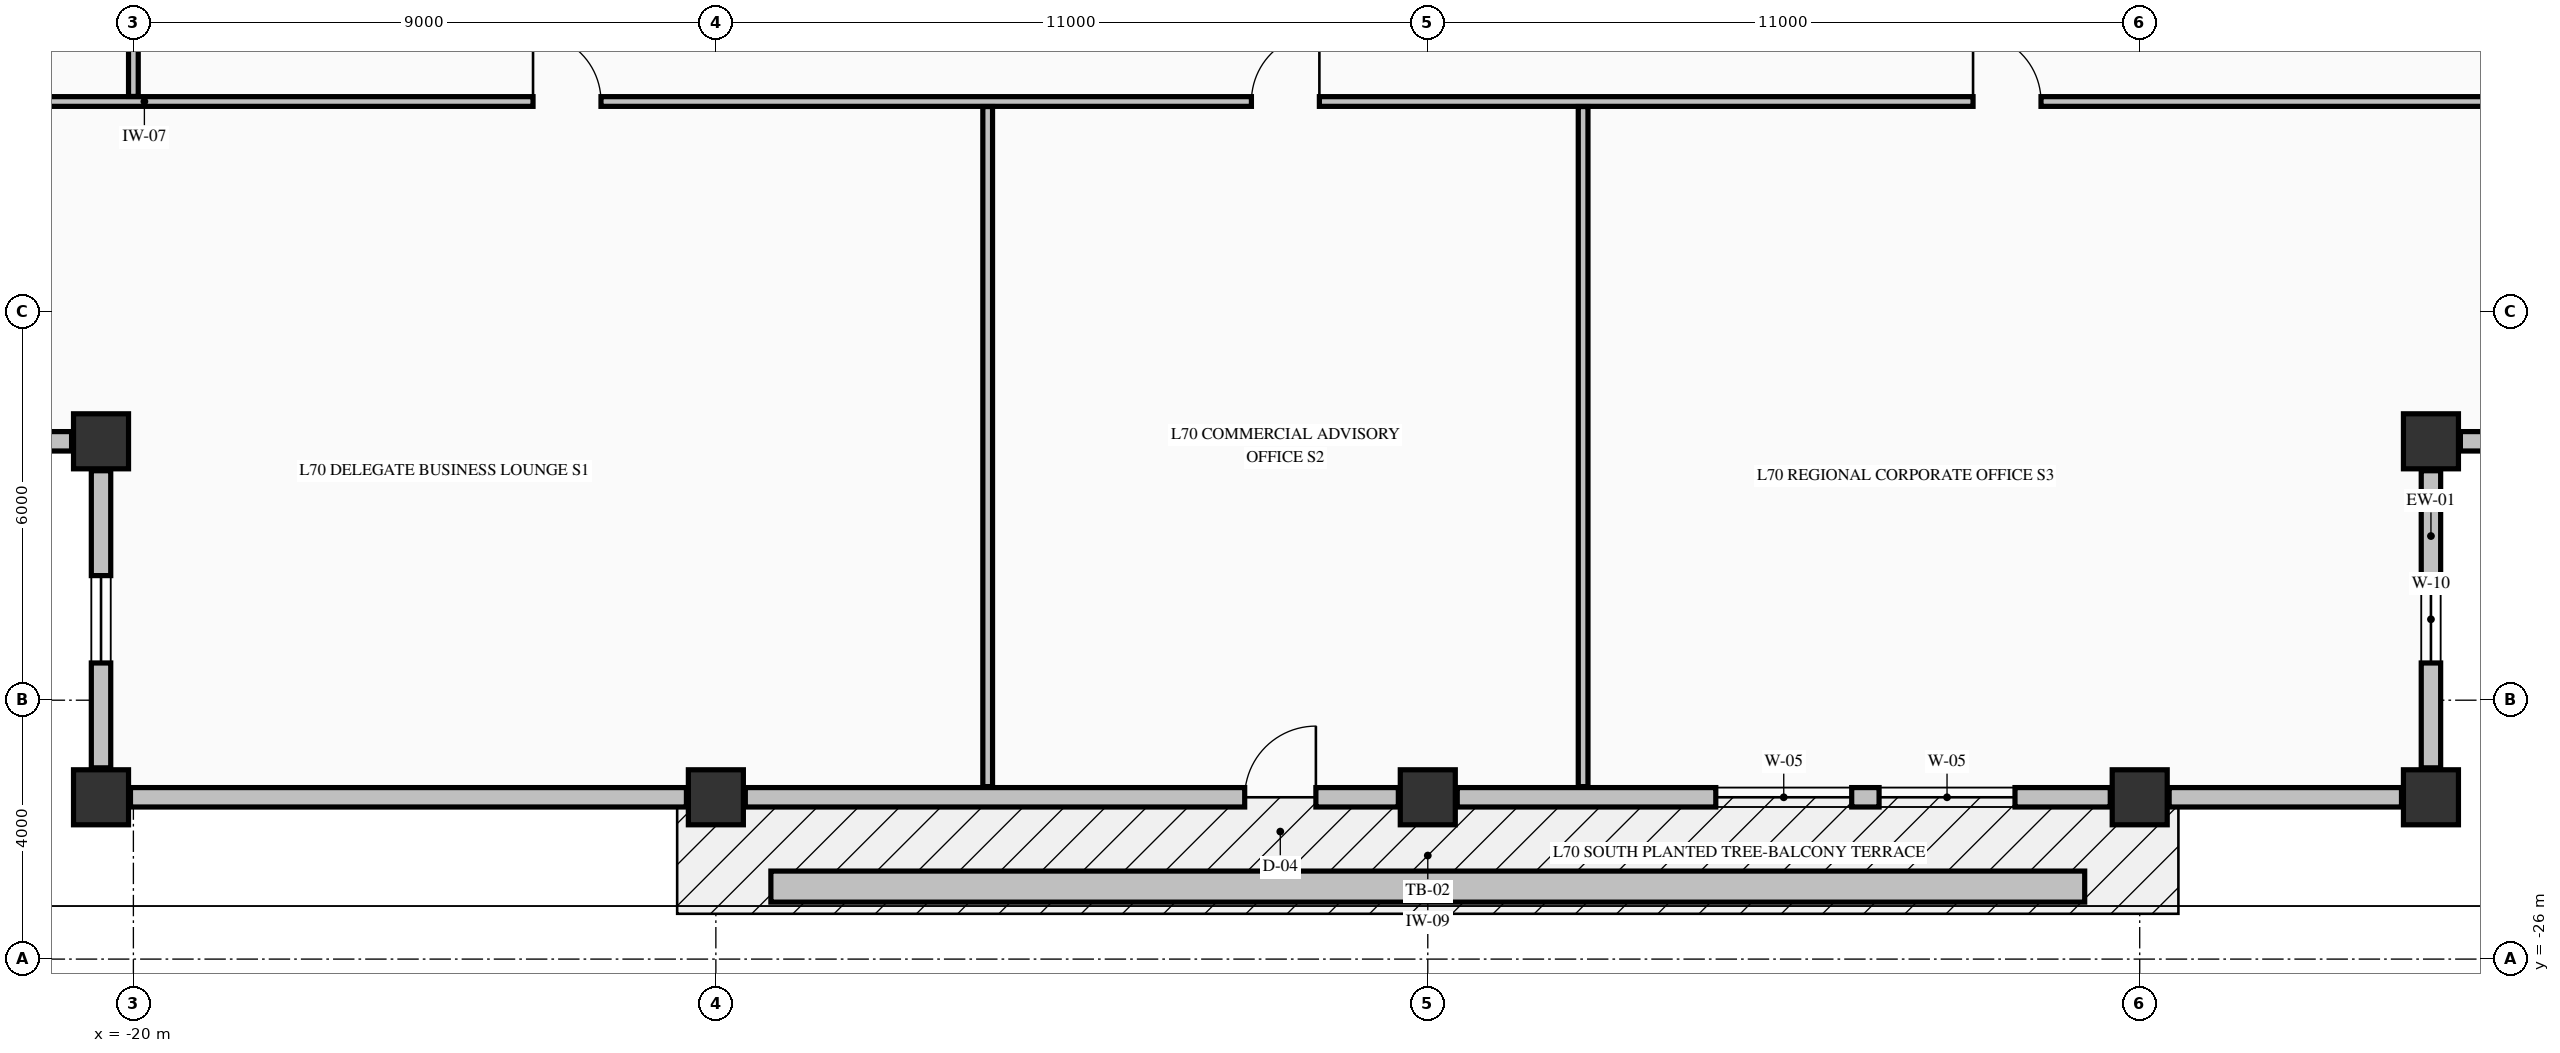
"""IFC4 building model, lengths in metres.
Left out: names, types, materials, properties, quantities, classifications, styles, units other than length and angle.
Written with IfcOpenShell. Run it as: python <this file> out.ifc"""

import sys

from ifc_helpers import new_model, si_unit, direction, frame, frame_2d, origin, origin_2d, place, context, subcontext, project, spatial, rectangle, extrude, element, fill, save


model = new_model("IFC4")
c1 = context("Model", 3, precision=1e-05, world=origin(), true_north=direction((0.0, 1.0)))
c2 = subcontext(c1, "Body", "Model", "MODEL_VIEW")
j1 = project(units=[si_unit("LENGTHUNIT", "METRE"), si_unit("PLANEANGLEUNIT", "RADIAN")], contexts=[c1])
p1 = place(None, origin())
s1 = spatial("IfcSite", under=j1, at=p1, CompositionType="ELEMENT")
p2 = place(p1, origin())
s2 = spatial("IfcBuilding", under=s1, at=p2, CompositionType="ELEMENT")
p3 = place(p2, frame((0.0, 0.0, 264.12)))
s3 = spatial("IfcBuildingStorey", under=s2, at=p3, CompositionType="ELEMENT", Elevation=264.12)
for number, where, z_axis, x_axis in (
    (1, (-20.5, -23.5, -0.25), (0.0, 0.0, 1.0), (1.0, 0.0, 0.0)),
    (2, (-11.0, -23.5, -0.25), (0.0, 0.0, 1.0), (1.0, 0.0, 0.0)),
    (3, (0.0, -23.5, -0.25), (0.0, 0.0, 1.0), (1.0, 0.0, 0.0)),
    (4, (11.0, -23.5, -0.25), (0.0, 0.0, 1.0), (1.0, 0.0, 0.0)),
    (5, (15.5, -23.5, -0.25), (0.0, 0.0, 1.0), (1.0, 0.0, 0.0)),
    (6, (-20.5, -18.0, -0.25), (0.0, 0.0, 1.0), (1.0, 0.0, 0.0)),
    (7, (15.5, -18.0, -0.25), (0.0, 0.0, 1.0), (1.0, 0.0, 0.0)),
):
    element("IfcColumn", number, at=place(p3, frame(where, z_axis=z_axis, x_axis=x_axis)), inside=s3, PredefinedType="COLUMN", context=c2, shape_type="SweptSolid", body=[
        extrude(rectangle(XDim=0.85, YDim=0.85, at=origin_2d()), origin(), (0.0, 0.0, 1.0), 3.23),
    ])
p4 = place(p3, frame((15.5, -23.045, 0.0), z_axis=(0.0, 0.0, 1.0), x_axis=(0.0, 1.0, 0.0)))
e8 = element("IfcWall", 8, at=p4, inside=s3, PredefinedType="STANDARD", context=c2, shape_type="SweptSolid", body=[
    extrude(rectangle(XDim=4.59, YDim=0.3, at=frame_2d((2.295, 0.0))), origin(), (0.0, 0.0, 1.0), 2.372),
])
p5 = place(p4, frame((1.62, 0.0, 0.68)))
e9 = element("IfcOpeningElement", 9, at=p5, cuts=e8, PredefinedType="OPENING", context=c2, shape_type="SweptSolid", body=[
    extrude(rectangle(XDim=1.35, YDim=1.42, at=frame_2d((0.675, 0.71))), frame((0.0, 0.16, 0.0), z_axis=(0.0, -1.0, 0.0), x_axis=(1.0, 0.0, 0.0)), (0.0, 0.0, 1.0), 0.32),
])
p6 = place(p3, frame((15.955, -18.0, 0.0), z_axis=(0.0, 0.0, 1.0), x_axis=(1.0, 0.0, 0.0)))
e10 = element("IfcWall", 10, at=p6, inside=s3, PredefinedType="STANDARD", context=c2, shape_type="SweptSolid", body=[
    extrude(rectangle(XDim=4.59, YDim=0.3, at=frame_2d((2.295, 0.0))), origin(), (0.0, 0.0, 1.0), 2.372),
])
p7 = place(p6, frame((1.62, 0.0, 0.68)))
e11 = element("IfcOpeningElement", 11, at=p7, cuts=e10, PredefinedType="OPENING", context=c2, shape_type="SweptSolid", body=[
    extrude(rectangle(XDim=1.35, YDim=1.42, at=frame_2d((0.675, 0.71))), frame((0.0, 0.16, 0.0), z_axis=(0.0, -1.0, 0.0), x_axis=(1.0, 0.0, 0.0)), (0.0, 0.0, 1.0), 0.32),
])
p8 = place(p3, frame((-25.545, -18.0, 0.0), z_axis=(0.0, 0.0, 1.0), x_axis=(1.0, 0.0, 0.0)))
e12 = element("IfcWall", 12, at=p8, inside=s3, PredefinedType="STANDARD", context=c2, shape_type="SweptSolid", body=[
    extrude(rectangle(XDim=4.59, YDim=0.3, at=frame_2d((2.295, 0.0))), origin(), (0.0, 0.0, 1.0), 2.372),
])
p9 = place(p8, frame((1.62, 0.0, 0.68)))
e13 = element("IfcOpeningElement", 13, at=p9, cuts=e12, PredefinedType="OPENING", context=c2, shape_type="SweptSolid", body=[
    extrude(rectangle(XDim=1.35, YDim=1.42, at=frame_2d((0.675, 0.71))), frame((0.0, 0.16, 0.0), z_axis=(0.0, -1.0, 0.0), x_axis=(1.0, 0.0, 0.0)), (0.0, 0.0, 1.0), 0.32),
])
p10 = place(p3, frame((-20.5, -18.455, 0.0), z_axis=(0.0, 0.0, 1.0), x_axis=(0.0, -1.0, 0.0)))
e14 = element("IfcWall", 14, at=p10, inside=s3, PredefinedType="STANDARD", context=c2, shape_type="SweptSolid", body=[
    extrude(rectangle(XDim=4.59, YDim=0.3, at=frame_2d((2.295, 0.0))), origin(), (0.0, 0.0, 1.0), 2.372),
])
p11 = place(p10, frame((1.62, 0.0, 0.68)))
e15 = element("IfcOpeningElement", 15, at=p11, cuts=e14, PredefinedType="OPENING", context=c2, shape_type="SweptSolid", body=[
    extrude(rectangle(XDim=1.35, YDim=1.42, at=frame_2d((0.675, 0.71))), frame((0.0, 0.16, 0.0), z_axis=(0.0, -1.0, 0.0), x_axis=(1.0, 0.0, 0.0)), (0.0, 0.0, 1.0), 0.32),
])
p12 = place(p3, frame((-20.045, -23.5, 0.0), z_axis=(0.0, 0.0, 1.0), x_axis=(1.0, 0.0, 0.0)))
e16 = element("IfcWall", 16, at=p12, inside=s3, PredefinedType="STANDARD", context=c2, shape_type="SweptSolid", body=[
    extrude(rectangle(XDim=8.59, YDim=0.3, at=frame_2d((4.295, 0.0))), origin(), (0.0, 0.0, 1.0), 2.372),
])
p13 = place(p3, frame((-10.545, -23.5, 0.0), z_axis=(0.0, 0.0, 1.0), x_axis=(1.0, 0.0, 0.0)))
e17 = element("IfcWall", 17, at=p13, inside=s3, PredefinedType="STANDARD", context=c2, shape_type="SweptSolid", body=[
    extrude(rectangle(XDim=10.09, YDim=0.3, at=frame_2d((5.045, 0.0))), origin(), (0.0, 0.0, 1.0), 2.372),
])
p14 = place(p13, frame((7.716, 0.0, 0.0)))
e18 = element("IfcOpeningElement", 18, at=p14, cuts=e17, PredefinedType="OPENING", context=c2, shape_type="SweptSolid", body=[
    extrude(rectangle(XDim=1.1, YDim=2.15, at=frame_2d((0.55, 1.075))), frame((0.0, 0.16, 0.0), z_axis=(0.0, -1.0, 0.0), x_axis=(1.0, 0.0, 0.0)), (0.0, 0.0, 1.0), 0.32),
])
p15 = place(p3, frame((0.455, -23.5, 0.0), z_axis=(0.0, 0.0, 1.0), x_axis=(1.0, 0.0, 0.0)))
e19 = element("IfcWall", 19, at=p15, inside=s3, PredefinedType="STANDARD", context=c2, shape_type="SweptSolid", body=[
    extrude(rectangle(XDim=10.09, YDim=0.3, at=frame_2d((5.045, 0.0))), origin(), (0.0, 0.0, 1.0), 2.372),
])
p16 = place(p15, frame((3.995, 0.0, 0.7)))
e20 = element("IfcOpeningElement", 20, at=p16, cuts=e19, PredefinedType="OPENING", context=c2, shape_type="SweptSolid", body=[
    extrude(rectangle(XDim=2.1, YDim=1.5, at=frame_2d((1.05, 0.75))), frame((0.0, 0.16, 0.0), z_axis=(0.0, -1.0, 0.0), x_axis=(1.0, 0.0, 0.0)), (0.0, 0.0, 1.0), 0.32),
])
p17 = place(p15, frame((6.518, 0.0, 0.7)))
e21 = element("IfcOpeningElement", 21, at=p17, cuts=e19, PredefinedType="OPENING", context=c2, shape_type="SweptSolid", body=[
    extrude(rectangle(XDim=2.1, YDim=1.5, at=frame_2d((1.05, 0.75))), frame((0.0, 0.16, 0.0), z_axis=(0.0, -1.0, 0.0), x_axis=(1.0, 0.0, 0.0)), (0.0, 0.0, 1.0), 0.32),
])
p18 = place(p3, frame((11.455, -23.5, 0.0), z_axis=(0.0, 0.0, 1.0), x_axis=(1.0, 0.0, 0.0)))
e22 = element("IfcWall", 22, at=p18, inside=s3, PredefinedType="STANDARD", context=c2, shape_type="SweptSolid", body=[
    extrude(rectangle(XDim=3.59, YDim=0.3, at=frame_2d((1.795, 0.0))), origin(), (0.0, 0.0, 1.0), 2.372),
])
p19 = place(p3, frame((-25.835, -12.75, 0.0), z_axis=(0.0, 0.0, 1.0), x_axis=(1.0, 0.0, 0.0)))
e23 = element("IfcWall", 23, at=p19, inside=s3, PredefinedType="PARTITIONING", context=c2, shape_type="SweptSolid", body=[
    extrude(rectangle(XDim=45.91, YDim=0.15, at=frame_2d((22.955, 0.0))), origin(), (0.0, 0.0, 1.0), 2.98),
])
p20 = place(p19, frame((12.01, 0.0, 0.0)))
e24 = element("IfcOpeningElement", 24, at=p20, cuts=e23, PredefinedType="OPENING", context=c2, shape_type="SweptSolid", body=[
    extrude(rectangle(XDim=1.05, YDim=2.15, at=frame_2d((0.525, 1.075))), frame((0.0, 0.085, 0.0), z_axis=(0.0, -1.0, 0.0), x_axis=(1.0, 0.0, 0.0)), (0.0, 0.0, 1.0), 0.17),
])
p21 = place(p19, frame((23.11, 0.0, 0.0)))
e25 = element("IfcOpeningElement", 25, at=p21, cuts=e23, PredefinedType="OPENING", context=c2, shape_type="SweptSolid", body=[
    extrude(rectangle(XDim=1.05, YDim=2.15, at=frame_2d((0.525, 1.075))), frame((0.0, 0.085, 0.0), z_axis=(0.0, -1.0, 0.0), x_axis=(1.0, 0.0, 0.0)), (0.0, 0.0, 1.0), 0.17),
])
p22 = place(p19, frame((34.26, 0.0, 0.0)))
e26 = element("IfcOpeningElement", 26, at=p22, cuts=e23, PredefinedType="OPENING", context=c2, shape_type="SweptSolid", body=[
    extrude(rectangle(XDim=1.05, YDim=2.15, at=frame_2d((0.525, 1.075))), frame((0.0, 0.085, 0.0), z_axis=(0.0, -1.0, 0.0), x_axis=(1.0, 0.0, 0.0)), (0.0, 0.0, 1.0), 0.17),
])
p23 = place(p3, frame((-20.0, -12.672, 0.0), z_axis=(0.0, 0.0, 1.0), x_axis=(0.0, 1.0, 0.0)))
e27 = element("IfcWall", 27, at=p23, inside=s3, PredefinedType="PARTITIONING", context=c2, shape_type="SweptSolid", body=[
    extrude(rectangle(XDim=2.366, YDim=0.15, at=frame_2d((1.183, 0.0))), origin(), (0.0, 0.0, 1.0), 2.98),
])
p24 = place(p23, frame((0.847, 0.0, 0.0)))
e28 = element("IfcOpeningElement", 28, at=p24, cuts=e27, PredefinedType="OPENING", context=c2, shape_type="SweptSolid", body=[
    extrude(rectangle(XDim=0.95, YDim=2.15, at=frame_2d((0.475, 1.075))), frame((0.0, 0.085, 0.0), z_axis=(0.0, -1.0, 0.0), x_axis=(1.0, 0.0, 0.0)), (0.0, 0.0, 1.0), 0.17),
])
for number, where, z_axis, x_axis in (
    (29, (-6.8, -23.335, 0.0), (0.0, 0.0, 1.0), (0.0, 1.0, 0.0)),
    (30, (2.4, -23.335, 0.0), (0.0, 0.0, 1.0), (0.0, 1.0, 0.0)),
):
    element("IfcWall", number, at=place(p3, frame(where, z_axis=z_axis, x_axis=x_axis)), inside=s3, PredefinedType="PARTITIONING", context=c2, shape_type="SweptSolid", body=[
        extrude(rectangle(XDim=10.507, YDim=0.15, at=frame_2d((5.253, 0.0))), origin(), (0.0, 0.0, 1.0), 2.98),
    ])
p25 = place(p3, frame((-10.15, -24.88, -0.04), z_axis=(0.0, 0.0, 1.0), x_axis=(1.0, 0.0, 0.0)))
e31 = element("IfcWall", 31, at=p25, inside=s3, PredefinedType="PARAPET", context=c2, shape_type="SweptSolid", body=[
    extrude(rectangle(XDim=20.3, YDim=0.48, at=frame_2d((10.15, 0.0))), origin(), (0.0, 0.0, 1.0), 0.52),
])
p26 = place(p5, origin())
e32 = element("IfcWindow", 32, at=p26, inside=s3, PartitioningType="SINGLE_PANEL", PredefinedType="WINDOW", context=c2, shape_type="SweptSolid", body=[
    extrude(rectangle(XDim=1.35, YDim=1.42, at=frame_2d((0.675, 0.71))), frame((0.0, 0.03, 0.0), z_axis=(0.0, -1.0, 0.0), x_axis=(1.0, 0.0, 0.0)), (0.0, 0.0, 1.0), 0.06),
])
fill(e9, e32)
p27 = place(p11, origin())
e33 = element("IfcWindow", 33, at=p27, inside=s3, PartitioningType="SINGLE_PANEL", PredefinedType="WINDOW", context=c2, shape_type="SweptSolid", body=[
    extrude(rectangle(XDim=1.35, YDim=1.42, at=frame_2d((0.675, 0.71))), frame((0.0, 0.03, 0.0), z_axis=(0.0, -1.0, 0.0), x_axis=(1.0, 0.0, 0.0)), (0.0, 0.0, 1.0), 0.06),
])
fill(e15, e33)
p28 = place(p14, origin())
e34 = element("IfcDoor", 34, at=p28, inside=s3, OperationType="SINGLE_SWING_RIGHT", PredefinedType="DOOR", context=c2, shape_type="SweptSolid", body=[
    extrude(rectangle(XDim=1.1, YDim=2.15, at=frame_2d((0.55, 1.075))), frame((0.0, 0.025, 0.0), z_axis=(0.0, -1.0, 0.0), x_axis=(1.0, 0.0, 0.0)), (0.0, 0.0, 1.0), 0.05),
])
fill(e18, e34)
p29 = place(p16, origin())
e35 = element("IfcWindow", 35, at=p29, inside=s3, PartitioningType="SINGLE_PANEL", PredefinedType="WINDOW", context=c2, shape_type="SweptSolid", body=[
    extrude(rectangle(XDim=2.1, YDim=1.5, at=frame_2d((1.05, 0.75))), frame((0.0, 0.03, 0.0), z_axis=(0.0, -1.0, 0.0), x_axis=(1.0, 0.0, 0.0)), (0.0, 0.0, 1.0), 0.06),
])
fill(e20, e35)
p30 = place(p17, origin())
e36 = element("IfcWindow", 36, at=p30, inside=s3, PartitioningType="SINGLE_PANEL", PredefinedType="WINDOW", context=c2, shape_type="SweptSolid", body=[
    extrude(rectangle(XDim=2.1, YDim=1.5, at=frame_2d((1.05, 0.75))), frame((0.0, 0.03, 0.0), z_axis=(0.0, -1.0, 0.0), x_axis=(1.0, 0.0, 0.0)), (0.0, 0.0, 1.0), 0.06),
])
fill(e21, e36)
p31 = place(p20, origin())
e37 = element("IfcDoor", 37, at=p31, inside=s3, OperationType="SINGLE_SWING_LEFT", PredefinedType="DOOR", context=c2, shape_type="SweptSolid", body=[
    extrude(rectangle(XDim=1.05, YDim=2.15, at=frame_2d((0.525, 1.075))), frame((0.0, 0.025, 0.0), z_axis=(0.0, -1.0, 0.0), x_axis=(1.0, 0.0, 0.0)), (0.0, 0.0, 1.0), 0.05),
])
fill(e24, e37)
p32 = place(p21, origin())
e38 = element("IfcDoor", 38, at=p32, inside=s3, OperationType="SINGLE_SWING_RIGHT", PredefinedType="DOOR", context=c2, shape_type="SweptSolid", body=[
    extrude(rectangle(XDim=1.05, YDim=2.15, at=frame_2d((0.525, 1.075))), frame((0.0, 0.025, 0.0), z_axis=(0.0, -1.0, 0.0), x_axis=(1.0, 0.0, 0.0)), (0.0, 0.0, 1.0), 0.05),
])
fill(e25, e38)
p33 = place(p22, origin())
e39 = element("IfcDoor", 39, at=p33, inside=s3, OperationType="SINGLE_SWING_LEFT", PredefinedType="DOOR", context=c2, shape_type="SweptSolid", body=[
    extrude(rectangle(XDim=1.05, YDim=2.15, at=frame_2d((0.525, 1.075))), frame((0.0, 0.025, 0.0), z_axis=(0.0, -1.0, 0.0), x_axis=(1.0, 0.0, 0.0)), (0.0, 0.0, 1.0), 0.05),
])
fill(e26, e39)
save(model, sys.argv[1])
